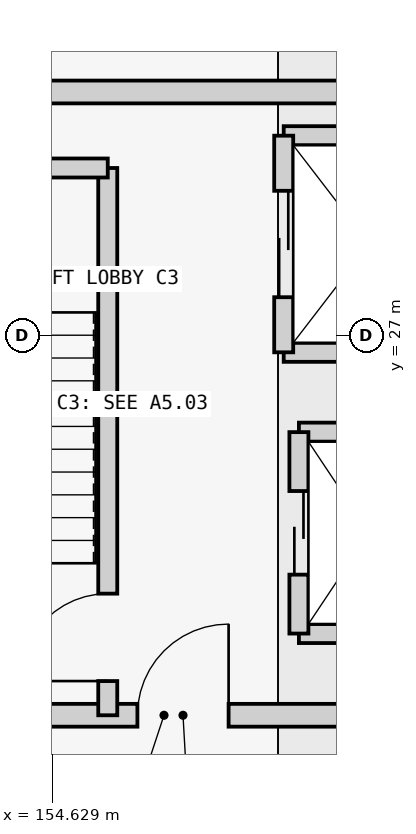
"""IFC4 building model, lengths in metres.
Left out: names, types, materials, properties, quantities, classifications, styles, units other than length and angle.
Written with IfcOpenShell. Run it as: python <this file> out.ifc"""

import sys

from ifc_helpers import new_model, si_unit, direction, frame, frame_2d, origin, place, context, subcontext, project, spatial, rectangle, extrude, element, fill, save


model = new_model("IFC4")
c1 = context("Model", 3, precision=1e-05, world=origin(), true_north=direction((0.0, 1.0)))
c2 = subcontext(c1, "Body", "Model", "MODEL_VIEW")
j1 = project(units=[si_unit("LENGTHUNIT", "METRE"), si_unit("PLANEANGLEUNIT", "RADIAN")], contexts=[c1])
p1 = place(None, origin())
s1 = spatial("IfcSite", under=j1, at=p1, CompositionType="ELEMENT")
p2 = place(p1, origin())
s2 = spatial("IfcBuilding", under=s1, at=p2, CompositionType="ELEMENT")
p3 = place(p2, frame((0.0, 0.0, -4.2)))
s3 = spatial("IfcBuildingStorey", under=s2, at=p3, CompositionType="ELEMENT", Elevation=-4.2)
p4 = place(p3, frame((151.0, 22.0, 0.0), z_axis=(0.0, 0.0, 1.0), x_axis=(1.0, 0.0, 0.0)))
e1 = element("IfcWall", 1, at=p4, inside=s3, PredefinedType="SHEAR", context=c2, shape_type="SweptSolid", body=[
    extrude(rectangle(XDim=10.2, YDim=0.3, at=frame_2d((5.1, 0.0))), origin(), (0.0, 0.0, 1.0), 3.94),
])
p5 = place(p4, frame((4.75, 0.0, 0.0)))
e2 = element("IfcOpeningElement", 2, at=p5, cuts=e1, PredefinedType="OPENING", context=c2, shape_type="SweptSolid", body=[
    extrude(rectangle(XDim=1.2, YDim=2.15, at=frame_2d((0.6, 1.075))), frame((0.0, 0.16, 0.0), z_axis=(0.0, -1.0, 0.0), x_axis=(1.0, 0.0, 0.0)), (0.0, 0.0, 1.0), 0.32),
])
p6 = place(p3, frame((161.2, 30.2, 0.0), z_axis=(0.0, 0.0, 1.0), x_axis=(-1.0, 0.0, 0.0)))
e3 = element("IfcWall", 3, at=p6, inside=s3, PredefinedType="SHEAR", context=c2, shape_type="SweptSolid", body=[
    extrude(rectangle(XDim=10.2, YDim=0.3, at=frame_2d((5.1, 0.0))), origin(), (0.0, 0.0, 1.0), 3.94),
])
p7 = place(p3, frame((155.36, 22.0, 0.0), z_axis=(0.0, 0.0, 1.0), x_axis=(0.0, 1.0, 0.0)))
e4 = element("IfcWall", 4, at=p7, inside=s3, PredefinedType="SHEAR", context=c2, shape_type="SweptSolid", body=[
    extrude(rectangle(XDim=7.2, YDim=0.25, at=frame_2d((3.6, 0.0))), origin(), (0.0, 0.0, 1.0), 3.94),
])
p8 = place(p7, frame((0.45, 0.0, 0.0)))
e5 = element("IfcOpeningElement", 5, at=p8, cuts=e4, PredefinedType="OPENING", context=c2, shape_type="SweptSolid", body=[
    extrude(rectangle(XDim=1.15, YDim=2.15, at=frame_2d((0.575, 1.075))), frame((0.0, 0.135, 0.0), z_axis=(0.0, -1.0, 0.0), x_axis=(1.0, 0.0, 0.0)), (0.0, 0.0, 1.0), 0.27),
])
p9 = place(p3, frame((151.0, 29.2, 0.0), z_axis=(0.0, 0.0, 1.0), x_axis=(1.0, 0.0, 0.0)))
e6 = element("IfcWall", 6, at=p9, inside=s3, PredefinedType="SHEAR", context=c2, shape_type="SweptSolid", body=[
    extrude(rectangle(XDim=4.36, YDim=0.25, at=frame_2d((2.18, 0.0))), origin(), (0.0, 0.0, 1.0), 3.94),
])
for number, where, z_axis, x_axis in (
    (7, (157.875, 23.075, 0.0), (0.0, 0.0, 1.0), (1.0, 0.0, 0.0)),
    (8, (157.875, 25.725, 0.0), (0.0, 0.0, 1.0), (1.0, 0.0, 0.0)),
):
    element("IfcWall", number, at=place(p3, frame(where, z_axis=z_axis, x_axis=x_axis)), inside=s3, PredefinedType="SHEAR", context=c2, shape_type="SweptSolid", body=[
        extrude(rectangle(XDim=1.85, YDim=0.25, at=frame_2d((0.925, 0.0))), origin(), (0.0, 0.0, 1.0), 3.94),
    ])
p10 = place(p3, frame((157.875, 23.075, 0.0), z_axis=(0.0, 0.0, 1.0), x_axis=(0.0, 1.0, 0.0)))
e9 = element("IfcWall", 9, at=p10, inside=s3, PredefinedType="SHEAR", context=c2, shape_type="SweptSolid", body=[
    extrude(rectangle(XDim=2.65, YDim=0.25, at=frame_2d((1.325, 0.0))), origin(), (0.0, 0.0, 1.0), 3.94),
])
p11 = place(p10, frame((0.775, 0.0, 0.0)))
e10 = element("IfcOpeningElement", 10, at=p11, cuts=e9, PredefinedType="OPENING", context=c2, shape_type="SweptSolid", body=[
    extrude(rectangle(XDim=1.1, YDim=2.15, at=frame_2d((0.55, 1.075))), frame((0.0, 0.135, 0.0), z_axis=(0.0, -1.0, 0.0), x_axis=(1.0, 0.0, 0.0)), (0.0, 0.0, 1.0), 0.27),
])
for number, where, z_axis, x_axis in (
    (11, (157.675, 26.775, 0.0), (0.0, 0.0, 1.0), (1.0, 0.0, 0.0)),
    (12, (157.675, 29.625, 0.0), (0.0, 0.0, 1.0), (1.0, 0.0, 0.0)),
):
    element("IfcWall", number, at=place(p3, frame(where, z_axis=z_axis, x_axis=x_axis)), inside=s3, PredefinedType="SHEAR", context=c2, shape_type="SweptSolid", body=[
        extrude(rectangle(XDim=2.25, YDim=0.25, at=frame_2d((1.125, 0.0))), origin(), (0.0, 0.0, 1.0), 3.94),
    ])
p12 = place(p3, frame((157.675, 26.775, 0.0), z_axis=(0.0, 0.0, 1.0), x_axis=(0.0, 1.0, 0.0)))
e13 = element("IfcWall", 13, at=p12, inside=s3, PredefinedType="SHEAR", context=c2, shape_type="SweptSolid", body=[
    extrude(rectangle(XDim=2.85, YDim=0.25, at=frame_2d((1.425, 0.0))), origin(), (0.0, 0.0, 1.0), 3.94),
])
p13 = place(p12, frame((0.725, 0.0, 0.0)))
e14 = element("IfcOpeningElement", 14, at=p13, cuts=e13, PredefinedType="OPENING", context=c2, shape_type="SweptSolid", body=[
    extrude(rectangle(XDim=1.4, YDim=2.2, at=frame_2d((0.7, 1.1))), frame((0.0, 0.135, 0.0), z_axis=(0.0, -1.0, 0.0), x_axis=(1.0, 0.0, 0.0)), (0.0, 0.0, 1.0), 0.27),
])
p14 = place(p8, origin())
e15 = element("IfcDoor", 15, at=p14, inside=s3, OperationType="SINGLE_SWING_LEFT", PredefinedType="DOOR", context=c2, shape_type="SweptSolid", body=[
    extrude(rectangle(XDim=1.15, YDim=2.15, at=frame_2d((0.575, 1.075))), frame((0.0, 0.025, 0.0), z_axis=(0.0, -1.0, 0.0), x_axis=(1.0, 0.0, 0.0)), (0.0, 0.0, 1.0), 0.05),
])
fill(e5, e15)
p15 = place(p5, origin())
e16 = element("IfcDoor", 16, at=p15, inside=s3, OperationType="SINGLE_SWING_RIGHT", PredefinedType="DOOR", context=c2, shape_type="SweptSolid", body=[
    extrude(rectangle(XDim=1.2, YDim=2.15, at=frame_2d((0.6, 1.075))), frame((0.0, 0.025, 0.0), z_axis=(0.0, -1.0, 0.0), x_axis=(1.0, 0.0, 0.0)), (0.0, 0.0, 1.0), 0.05),
])
fill(e2, e16)
p16 = place(p11, origin())
e17 = element("IfcDoor", 17, at=p16, inside=s3, OperationType="DOUBLE_DOOR_SLIDING", PredefinedType="USERDEFINED", context=c2, shape_type="SweptSolid", body=[
    extrude(rectangle(XDim=1.1, YDim=2.15, at=frame_2d((0.55, 1.075))), frame((0.0, 0.025, 0.0), z_axis=(0.0, -1.0, 0.0), x_axis=(1.0, 0.0, 0.0)), (0.0, 0.0, 1.0), 0.05),
])
fill(e10, e17)
p17 = place(p13, origin())
e18 = element("IfcDoor", 18, at=p17, inside=s3, OperationType="DOUBLE_DOOR_SLIDING", PredefinedType="USERDEFINED", context=c2, shape_type="SweptSolid", body=[
    extrude(rectangle(XDim=1.4, YDim=2.2, at=frame_2d((0.7, 1.1))), frame((0.0, 0.025, 0.0), z_axis=(0.0, -1.0, 0.0), x_axis=(1.0, 0.0, 0.0)), (0.0, 0.0, 1.0), 0.05),
])
fill(e14, e18)
save(model, sys.argv[1])
